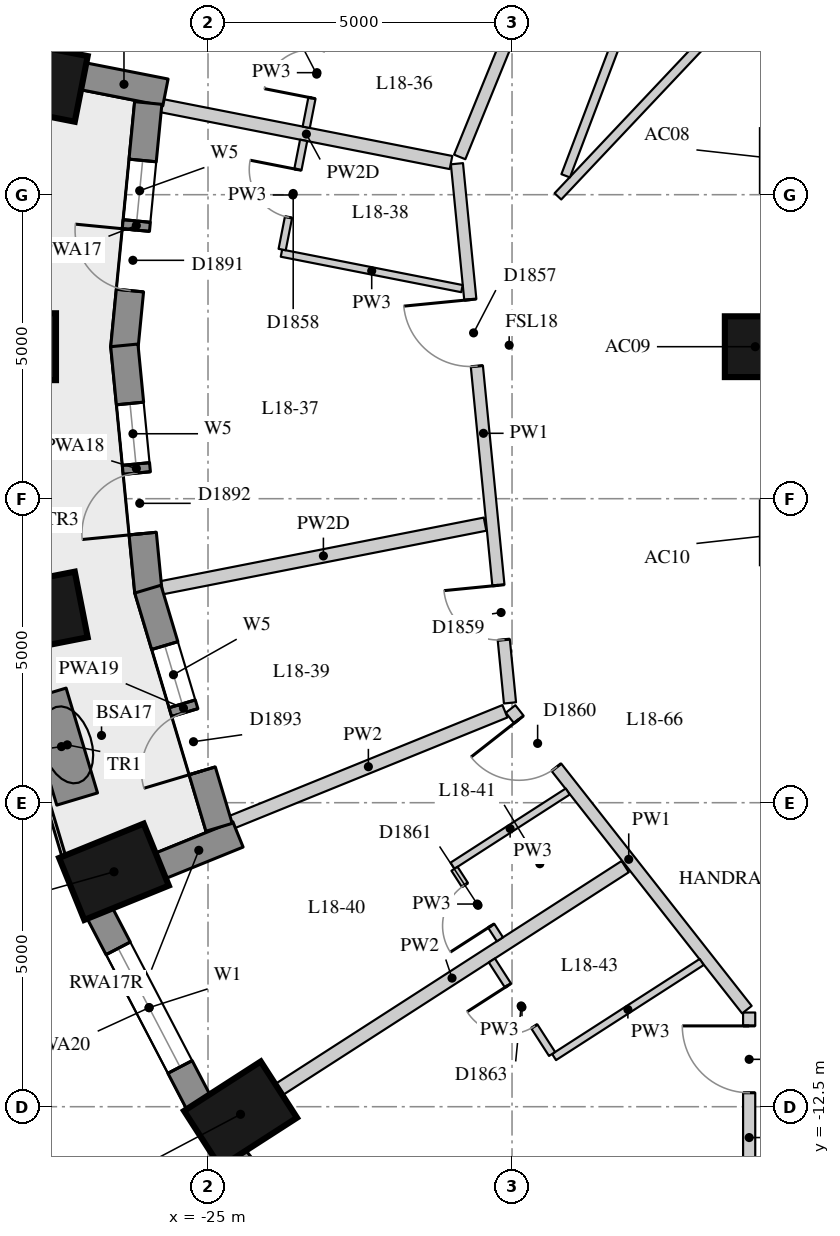
"""IFC4 building model, lengths in metres.
Left out: names, types, materials, properties, quantities, classifications, styles, units other than length and angle.
Written with IfcOpenShell. Run it as: python <this file> out.ifc"""

import sys

from ifc_helpers import new_model, si_unit, direction, frame, frame_2d, origin, origin_2d, place, context, subcontext, project, spatial, rectangle, extrude, element, fill, save


model = new_model("IFC4")
c1 = context("Model", 3, precision=1e-05, world=origin(), true_north=direction((0.0, 1.0)))
c2 = subcontext(c1, "Body", "Model", "MODEL_VIEW")
j1 = project(units=[si_unit("LENGTHUNIT", "METRE"), si_unit("PLANEANGLEUNIT", "RADIAN")], contexts=[c1])
p1 = place(None, origin())
s1 = spatial("IfcSite", under=j1, at=p1, CompositionType="ELEMENT")
p2 = place(p1, origin())
s2 = spatial("IfcBuilding", under=s1, at=p2, CompositionType="ELEMENT")
p3 = place(p2, frame((0.0, 0.0, 67.9)))
s3 = spatial("IfcBuildingStorey", under=s2, at=p3, CompositionType="ELEMENT", Elevation=67.9)
for number, where, z_axis, x_axis in (
    (1, (-27.821, 4.385, 0.0), (0.0, 0.0, 1.0), (-0.981, 0.193, 0.0)),
    (2, (-28.25, 0.0, 0.0), (0.0, 0.0, 1.0), (-1.0, 0.0, 0.0)),
    (3, (-27.821, -4.385, 0.0), (0.0, 0.0, 1.0), (-0.981, -0.193, 0.0)),
    (4, (-26.546, -8.636, 0.0), (0.0, 0.0, 1.0), (-0.927, -0.376, 0.0)),
    (5, (-24.465, -12.625, 0.0), (0.0, 0.0, 1.0), (-0.841, -0.541, 0.0)),
):
    element("IfcColumn", number, at=place(p3, frame(where, z_axis=z_axis, x_axis=x_axis)), inside=s3, PredefinedType="COLUMN", context=c2, shape_type="SweptSolid", body=[
        extrude(rectangle(XDim=1.5, YDim=1.1, at=origin_2d()), origin(), (0.0, 0.0, 1.0), 3.3),
    ])
p4 = place(p3, frame((-16.0, 0.0, 0.0), z_axis=(0.0, 0.0, 1.0), x_axis=(1.0, 0.0, 0.0)))
e6 = element("IfcColumn", 6, at=p4, inside=s3, PredefinedType="COLUMN", context=c2, shape_type="SweptSolid", body=[
    extrude(rectangle(XDim=1.0, YDim=1.0, at=origin_2d()), origin(), (0.0, 0.0, 1.0), 3.3),
])
p5 = place(p3, frame((-26.786, -9.305, 0.0), z_axis=(0.0, 0.0, 1.0), x_axis=(0.462492775226, -0.886623050041, 0.0)))
e7 = element("IfcWall", 7, at=p5, inside=s3, PredefinedType="SOLIDWALL", context=c2, shape_type="SweptSolid", body=[
    extrude(rectangle(XDim=3.532, YDim=0.45, at=frame_2d((1.766, 0.0))), origin(), (0.0, 0.0, 1.0), 3.02),
])
p6 = place(p5, frame((0.666, 0.0, 0.4)))
e8 = element("IfcOpeningElement", 8, at=p6, cuts=e7, PredefinedType="OPENING", context=c2, shape_type="SweptSolid", body=[
    extrude(rectangle(XDim=2.2, YDim=1.75, at=frame_2d((1.1, 0.875))), frame((0.0, 0.235, 0.0), z_axis=(0.0, -1.0, 0.0), x_axis=(1.0, 0.0, 0.0)), (0.0, 0.0, 1.0), 0.47),
])
p7 = place(p3, frame((-24.578, -13.328, 0.0), z_axis=(0.0, 0.0, 1.0), x_axis=(0.616661975264, -0.787228053529, 0.0)))
e9 = element("IfcWall", 9, at=p7, inside=s3, PredefinedType="SOLIDWALL", context=c2, shape_type="SweptSolid", body=[
    extrude(rectangle(XDim=3.61, YDim=0.45, at=frame_2d((1.805, 0.0))), origin(), (0.0, 0.0, 1.0), 3.02),
])
p8 = place(p7, frame((0.705, 0.0, 0.4)))
e10 = element("IfcOpeningElement", 10, at=p8, cuts=e9, PredefinedType="OPENING", context=c2, shape_type="SweptSolid", body=[
    extrude(rectangle(XDim=2.2, YDim=1.75, at=frame_2d((1.1, 0.875))), frame((0.0, 0.235, 0.0), z_axis=(0.0, -1.0, 0.0), x_axis=(1.0, 0.0, 0.0)), (0.0, 0.0, 1.0), 0.47),
])
p9 = place(p3, frame((-27.064, 4.45, 0.0), z_axis=(0.0, 0.0, 1.0), x_axis=(0.98123042829, -0.192838913596, 0.0)))
e11 = element("IfcWall", 11, at=p9, inside=s3, PredefinedType="SOLIDWALL", context=c2, shape_type="SweptSolid", body=[
    extrude(rectangle(XDim=1.39, YDim=0.45, at=frame_2d((0.695, 0.0))), origin(), (0.0, 0.0, 1.0), 2.47),
])
p10 = place(p3, frame((-25.796, -8.544, 0.0), z_axis=(0.0, 0.0, 1.0), x_axis=(0.926575599743, 0.376108572039, 0.0)))
e12 = element("IfcWall", 12, at=p10, inside=s3, PredefinedType="SOLIDWALL", context=c2, shape_type="SweptSolid", body=[
    extrude(rectangle(XDim=1.39, YDim=0.45, at=frame_2d((0.695, 0.0))), origin(), (0.0, 0.0, 1.0), 3.02),
])
p11 = place(p3, frame((-25.983, 4.008, 0.0), z_axis=(0.0, 0.0, 1.0), x_axis=(-0.097133468736, -0.995271364629, 0.0)))
e13 = element("IfcWall", 13, at=p11, inside=s3, PredefinedType="SOLIDWALL", context=c2, shape_type="SweptSolid", body=[
    extrude(rectangle(XDim=4.049, YDim=0.45, at=frame_2d((2.024, 0.0))), origin(), (0.0, 0.0, 1.0), 3.02),
])
p12 = place(p11, frame((0.949, 0.0, 0.4)))
e14 = element("IfcOpeningElement", 14, at=p12, cuts=e13, PredefinedType="OPENING", context=c2, shape_type="SweptSolid", body=[
    extrude(rectangle(XDim=1.0, YDim=1.75, at=frame_2d((0.5, 0.875))), frame((0.0, 0.235, 0.0), z_axis=(0.0, -1.0, 0.0), x_axis=(1.0, 0.0, 0.0)), (0.0, 0.0, 1.0), 0.47),
])
p13 = place(p11, frame((2.1, 0.0, 0.0)))
e15 = element("IfcOpeningElement", 15, at=p13, cuts=e13, PredefinedType="OPENING", context=c2, shape_type="SweptSolid", body=[
    extrude(rectangle(XDim=1.0, YDim=2.15, at=frame_2d((0.5, 1.075))), frame((0.0, 0.235, 0.0), z_axis=(0.0, -1.0, 0.0), x_axis=(1.0, 0.0, 0.0)), (0.0, 0.0, 1.0), 0.47),
])
p14 = place(p3, frame((-26.376, 0.022, 0.0), z_axis=(0.0, 0.0, 1.0), x_axis=(0.097092719726, -0.995275340685, 0.0)))
e16 = element("IfcWall", 16, at=p14, inside=s3, PredefinedType="SOLIDWALL", context=c2, shape_type="SweptSolid", body=[
    extrude(rectangle(XDim=4.071, YDim=0.45, at=frame_2d((2.036, 0.0))), origin(), (0.0, 0.0, 1.0), 3.02),
])
p15 = place(p14, frame((0.96, 0.0, 0.4)))
e17 = element("IfcOpeningElement", 17, at=p15, cuts=e16, PredefinedType="OPENING", context=c2, shape_type="SweptSolid", body=[
    extrude(rectangle(XDim=1.0, YDim=1.75, at=frame_2d((0.5, 0.875))), frame((0.0, 0.235, 0.0), z_axis=(0.0, -1.0, 0.0), x_axis=(1.0, 0.0, 0.0)), (0.0, 0.0, 1.0), 0.47),
])
p16 = place(p14, frame((2.111, 0.0, 0.0)))
e18 = element("IfcOpeningElement", 18, at=p16, cuts=e16, PredefinedType="OPENING", context=c2, shape_type="SweptSolid", body=[
    extrude(rectangle(XDim=1.0, YDim=2.15, at=frame_2d((0.5, 1.075))), frame((0.0, 0.235, 0.0), z_axis=(0.0, -1.0, 0.0), x_axis=(1.0, 0.0, 0.0)), (0.0, 0.0, 1.0), 0.47),
])
p17 = place(p3, frame((-25.989, -3.987, 0.0), z_axis=(0.0, 0.0, 1.0), x_axis=(0.286427456555, -0.958101932015, 0.0)))
e19 = element("IfcWall", 19, at=p17, inside=s3, PredefinedType="SOLIDWALL", context=c2, shape_type="SweptSolid", body=[
    extrude(rectangle(XDim=4.089, YDim=0.45, at=frame_2d((2.044, 0.0))), origin(), (0.0, 0.0, 1.0), 3.02),
])
p18 = place(p17, frame((0.969, 0.0, 0.4)))
e20 = element("IfcOpeningElement", 20, at=p18, cuts=e19, PredefinedType="OPENING", context=c2, shape_type="SweptSolid", body=[
    extrude(rectangle(XDim=1.0, YDim=1.75, at=frame_2d((0.5, 0.875))), frame((0.0, 0.235, 0.0), z_axis=(0.0, -1.0, 0.0), x_axis=(1.0, 0.0, 0.0)), (0.0, 0.0, 1.0), 0.47),
])
p19 = place(p17, frame((2.119, 0.0, 0.0)))
e21 = element("IfcOpeningElement", 21, at=p19, cuts=e19, PredefinedType="OPENING", context=c2, shape_type="SweptSolid", body=[
    extrude(rectangle(XDim=1.0, YDim=2.15, at=frame_2d((0.5, 1.075))), frame((0.0, 0.235, 0.0), z_axis=(0.0, -1.0, 0.0), x_axis=(1.0, 0.0, 0.0)), (0.0, 0.0, 1.0), 0.47),
])
p20 = place(p3, frame((-27.669, -5.715, 0.0), z_axis=(0.0, 0.0, 1.0), x_axis=(0.287024312863, -0.957923297465, 0.0)))
e22 = element("IfcWall", 22, at=p20, inside=s3, PredefinedType="USERDEFINED", context=c2, shape_type="SweptSolid", body=[
    extrude(rectangle(XDim=1.8, YDim=0.7, at=frame_2d((0.9, 0.0))), origin(), (0.0, 0.0, 1.0), 0.75),
])
p21 = place(p3, frame((-16.1, -15.064, 0.0), z_axis=(0.0, 0.0, 1.0), x_axis=(0.0, 1.0, 0.0)))
e23 = element("IfcWall", 23, at=p21, inside=s3, PredefinedType="PARTITIONING", context=c2, shape_type="SweptSolid", body=[
    extrude(rectangle(XDim=4.113, YDim=0.2, at=frame_2d((2.057, 0.0))), origin(), (0.0, 0.0, 1.0), 3.02),
])
p22 = place(p21, frame((2.793, 0.0, 0.0)))
e24 = element("IfcOpeningElement", 24, at=p22, cuts=e23, PredefinedType="OPENING", context=c2, shape_type="SweptSolid", body=[
    extrude(rectangle(XDim=1.1, YDim=2.1, at=frame_2d((0.55, 1.05))), frame((0.0, 0.11, 0.0), z_axis=(0.0, -1.0, 0.0), x_axis=(1.0, 0.0, 0.0)), (0.0, 0.0, 1.0), 0.22),
])
p23 = place(p3, frame((-16.137, -10.904, 0.0), z_axis=(0.0, 0.0, 1.0), x_axis=(-0.617888403737, 0.786265807808, 0.0)))
e25 = element("IfcWall", 25, at=p23, inside=s3, PredefinedType="PARTITIONING", context=c2, shape_type="SweptSolid", body=[
    extrude(rectangle(XDim=6.29, YDim=0.2, at=frame_2d((3.145, 0.0))), origin(), (0.0, 0.0, 1.0), 3.02),
])
p24 = place(p23, frame((5.07, 0.0, 0.0)))
e26 = element("IfcOpeningElement", 26, at=p24, cuts=e25, PredefinedType="OPENING", context=c2, shape_type="SweptSolid", body=[
    extrude(rectangle(XDim=1.0, YDim=2.1, at=frame_2d((0.5, 1.05))), frame((0.0, 0.11, 0.0), z_axis=(0.0, -1.0, 0.0), x_axis=(1.0, 0.0, 0.0)), (0.0, 0.0, 1.0), 0.22),
])
p25 = place(p3, frame((-20.034, -5.858, 0.0), z_axis=(0.0, 0.0, 1.0), x_axis=(-0.097894942705, 0.995196754513, 0.0)))
e27 = element("IfcWall", 27, at=p25, inside=s3, PredefinedType="PARTITIONING", context=c2, shape_type="SweptSolid", body=[
    extrude(rectangle(XDim=8.911, YDim=0.2, at=frame_2d((4.455, 0.0))), origin(), (0.0, 0.0, 1.0), 3.02),
])
p26 = place(p25, frame((5.565, 0.0, 0.0)))
e28 = element("IfcOpeningElement", 28, at=p26, cuts=e27, PredefinedType="OPENING", context=c2, shape_type="SweptSolid", body=[
    extrude(rectangle(XDim=1.1, YDim=2.1, at=frame_2d((0.55, 1.05))), frame((0.0, 0.11, 0.0), z_axis=(0.0, -1.0, 0.0), x_axis=(1.0, 0.0, 0.0)), (0.0, 0.0, 1.0), 0.22),
])
p27 = place(p25, frame((1.044, 0.0, 0.0)))
e29 = element("IfcOpeningElement", 29, at=p27, cuts=e27, PredefinedType="OPENING", context=c2, shape_type="SweptSolid", body=[
    extrude(rectangle(XDim=0.9, YDim=2.1, at=frame_2d((0.45, 1.05))), frame((0.0, 0.11, 0.0), z_axis=(0.0, -1.0, 0.0), x_axis=(1.0, 0.0, 0.0)), (0.0, 0.0, 1.0), 0.22),
])
p28 = place(p3, frame((-20.861, 3.121, 0.0), z_axis=(0.0, 0.0, 1.0), x_axis=(0.377214346955, 0.926125983034, 0.0)))
e30 = element("IfcWall", 30, at=p28, inside=s3, PredefinedType="PARTITIONING", context=c2, shape_type="SweptSolid", body=[
    extrude(rectangle(XDim=6.107, YDim=0.2, at=frame_2d((3.054, 0.0))), origin(), (0.0, 0.0, 1.0), 3.02),
])
p29 = place(p28, frame((2.285, 0.0, 0.0)))
e31 = element("IfcOpeningElement", 31, at=p29, cuts=e30, PredefinedType="OPENING", context=c2, shape_type="SweptSolid", body=[
    extrude(rectangle(XDim=1.1, YDim=2.1, at=frame_2d((0.55, 1.05))), frame((0.0, 0.11, 0.0), z_axis=(0.0, -1.0, 0.0), x_axis=(1.0, 0.0, 0.0)), (0.0, 0.0, 1.0), 0.22),
])
p30 = place(p3, frame((-14.499, 7.501, 0.0), z_axis=(0.0, 0.0, 1.0), x_axis=(-0.686403699782, -0.727220709913, 0.0)))
e32 = element("IfcWall", 32, at=p30, inside=s3, PredefinedType="PARTITIONING", context=c2, shape_type="SweptSolid", body=[
    extrude(rectangle(XDim=6.915, YDim=0.15, at=frame_2d((3.457, 0.0))), origin(), (0.0, 0.0, 1.0), 3.02),
])
p31 = place(p3, frame((-19.118, 2.811, 0.0), z_axis=(0.0, 0.0, 1.0), x_axis=(0.35451573991, 0.935050046872, 0.0)))
e33 = element("IfcWall", 33, at=p31, inside=s3, PredefinedType="PARTITIONING", context=c2, shape_type="SweptSolid", body=[
    extrude(rectangle(XDim=5.367, YDim=0.15, at=frame_2d((2.684, 0.0))), origin(), (0.0, 0.0, 1.0), 3.02),
])
p32 = place(p3, frame((-25.761, 3.964, 0.0), z_axis=(0.0, 0.0, 1.0), x_axis=(0.981216494224, -0.192909801364, 0.0)))
e34 = element("IfcWall", 34, at=p32, inside=s3, PredefinedType="PARTITIONING", context=c2, shape_type="SweptSolid", body=[
    extrude(rectangle(XDim=4.848, YDim=0.22, at=frame_2d((2.424, 0.0))), origin(), (0.0, 0.0, 1.0), 2.47),
])
p33 = place(p3, frame((-25.761, -3.964, 0.0), z_axis=(0.0, 0.0, 1.0), x_axis=(0.981209698951, 0.192944361627, 0.0)))
e35 = element("IfcWall", 35, at=p33, inside=s3, PredefinedType="PARTITIONING", context=c2, shape_type="SweptSolid", body=[
    extrude(rectangle(XDim=5.419, YDim=0.22, at=frame_2d((2.71, 0.0))), origin(), (0.0, 0.0, 1.0), 2.47),
])
p34 = place(p3, frame((-24.608, -7.82, 0.0), z_axis=(0.0, 0.0, 1.0), x_axis=(0.92655764882, 0.376152792643, 0.0)))
e36 = element("IfcWall", 36, at=p34, inside=s3, PredefinedType="PARTITIONING", context=c2, shape_type="SweptSolid", body=[
    extrude(rectangle(XDim=4.848, YDim=0.22, at=frame_2d((2.424, 0.0))), origin(), (0.0, 0.0, 1.0), 3.02),
])
p35 = place(p3, frame((-23.835, -12.219, 0.0), z_axis=(0.0, 0.0, 1.0), x_axis=(0.840749666863, 0.541424046076, 0.0)))
e37 = element("IfcWall", 37, at=p35, inside=s3, PredefinedType="PARTITIONING", context=c2, shape_type="SweptSolid", body=[
    extrude(rectangle(XDim=6.775, YDim=0.22, at=frame_2d((3.387, 0.0))), origin(), (0.0, 0.0, 1.0), 3.02),
])
p36 = place(p3, frame((-20.823, 0.955, 0.0), z_axis=(0.0, 0.0, 1.0), x_axis=(-0.981208735185, 0.192949262754, 0.0)))
e38 = element("IfcWall", 38, at=p36, inside=s3, PredefinedType="PARTITIONING", context=c2, shape_type="SweptSolid", body=[
    extrude(rectangle(XDim=3.025, YDim=0.12, at=frame_2d((1.513, 0.0))), origin(), (0.0, 0.0, 1.0), 3.02),
])
p37 = place(p3, frame((-19.084, -7.316, 0.0), z_axis=(0.0, 0.0, 1.0), x_axis=(-0.840762836723, -0.54140359473, 0.0)))
e39 = element("IfcWall", 39, at=p37, inside=s3, PredefinedType="PARTITIONING", context=c2, shape_type="SweptSolid", body=[
    extrude(rectangle(XDim=2.253, YDim=0.12, at=frame_2d((1.127, 0.0))), origin(), (0.0, 0.0, 1.0), 3.02),
])
p38 = place(p3, frame((-16.881, -10.12, 0.0), z_axis=(0.0, 0.0, 1.0), x_axis=(-0.840749755927, -0.541423907773, 0.0)))
e40 = element("IfcWall", 40, at=p38, inside=s3, PredefinedType="PARTITIONING", context=c2, shape_type="SweptSolid", body=[
    extrude(rectangle(XDim=2.888, YDim=0.12, at=frame_2d((1.444, 0.0))), origin(), (0.0, 0.0, 1.0), 3.02),
])
p39 = place(p3, frame((-23.032, 5.405, 0.0), z_axis=(0.0, 0.0, 1.0), x_axis=(-0.19288291118, -0.981221780524, 0.0)))
e41 = element("IfcWall", 41, at=p39, inside=s3, PredefinedType="PARTITIONING", context=c2, shape_type="SweptSolid", body=[
    extrude(rectangle(XDim=1.83, YDim=0.12, at=frame_2d((0.915, 0.0))), origin(), (0.0, 0.0, 1.0), 3.02),
])
p40 = place(p39, frame((0.54, 0.0, 0.0)))
e42 = element("IfcOpeningElement", 42, at=p40, cuts=e41, PredefinedType="OPENING", context=c2, shape_type="SweptSolid", body=[
    extrude(rectangle(XDim=0.8, YDim=2.1, at=frame_2d((0.4, 1.05))), frame((0.0, 0.07, 0.0), z_axis=(0.0, -1.0, 0.0), x_axis=(1.0, 0.0, 0.0)), (0.0, 0.0, 1.0), 0.14),
])
p41 = place(p3, frame((-23.781, 1.598, 0.0), z_axis=(0.0, 0.0, 1.0), x_axis=(0.193036598643, 0.981191557029, 0.0)))
e43 = element("IfcWall", 43, at=p41, inside=s3, PredefinedType="PARTITIONING", context=c2, shape_type="SweptSolid", body=[
    extrude(rectangle(XDim=1.83, YDim=0.12, at=frame_2d((0.915, 0.0))), origin(), (0.0, 0.0, 1.0), 3.02),
])
p42 = place(p41, frame((0.54, 0.0, 0.0)))
e44 = element("IfcOpeningElement", 44, at=p42, cuts=e43, PredefinedType="OPENING", context=c2, shape_type="SweptSolid", body=[
    extrude(rectangle(XDim=0.8, YDim=2.1, at=frame_2d((0.4, 1.05))), frame((0.0, 0.07, 0.0), z_axis=(0.0, -1.0, 0.0), x_axis=(1.0, 0.0, 0.0)), (0.0, 0.0, 1.0), 0.14),
])
p43 = place(p3, frame((-20.946, -8.587, 0.0), z_axis=(0.0, 0.0, 1.0), x_axis=(0.541526323973, -0.840683793375, 0.0)))
e45 = element("IfcWall", 45, at=p43, inside=s3, PredefinedType="PARTITIONING", context=c2, shape_type="SweptSolid", body=[
    extrude(rectangle(XDim=1.38, YDim=0.12, at=frame_2d((0.69, 0.0))), origin(), (0.0, 0.0, 1.0), 3.02),
])
p44 = place(p43, frame((0.315, 0.0, 0.0)))
e46 = element("IfcOpeningElement", 46, at=p44, cuts=e45, PredefinedType="OPENING", context=c2, shape_type="SweptSolid", body=[
    extrude(rectangle(XDim=0.8, YDim=2.1, at=frame_2d((0.4, 1.05))), frame((0.0, 0.07, 0.0), z_axis=(0.0, -1.0, 0.0), x_axis=(1.0, 0.0, 0.0)), (0.0, 0.0, 1.0), 0.14),
])
p45 = place(p3, frame((-19.341, -11.633, 0.0), z_axis=(0.0, 0.0, 1.0), x_axis=(-0.541391271501, 0.840770772055, 0.0)))
e47 = element("IfcWall", 47, at=p45, inside=s3, PredefinedType="PARTITIONING", context=c2, shape_type="SweptSolid", body=[
    extrude(rectangle(XDim=1.83, YDim=0.12, at=frame_2d((0.915, 0.0))), origin(), (0.0, 0.0, 1.0), 3.02),
])
p46 = place(p45, frame((0.54, 0.0, 0.0)))
e48 = element("IfcOpeningElement", 48, at=p46, cuts=e47, PredefinedType="OPENING", context=c2, shape_type="SweptSolid", body=[
    extrude(rectangle(XDim=0.8, YDim=2.1, at=frame_2d((0.4, 1.05))), frame((0.0, 0.07, 0.0), z_axis=(0.0, -1.0, 0.0), x_axis=(1.0, 0.0, 0.0)), (0.0, 0.0, 1.0), 0.14),
])
p47 = place(p6, origin())
e49 = element("IfcWindow", 49, at=p47, inside=s3, PartitioningType="SINGLE_PANEL", PredefinedType="WINDOW", context=c2, shape_type="SweptSolid", body=[
    extrude(rectangle(XDim=2.2, YDim=1.75, at=frame_2d((1.1, 0.875))), frame((0.0, 0.035, 0.0), z_axis=(0.0, -1.0, 0.0), x_axis=(1.0, 0.0, 0.0)), (0.0, 0.0, 1.0), 0.06),
])
fill(e8, e49)
p48 = place(p12, origin())
e50 = element("IfcWindow", 50, at=p48, inside=s3, PartitioningType="SINGLE_PANEL", PredefinedType="WINDOW", context=c2, shape_type="SweptSolid", body=[
    extrude(rectangle(XDim=1.0, YDim=1.75, at=frame_2d((0.5, 0.875))), frame((0.0, 0.035, 0.0), z_axis=(0.0, -1.0, 0.0), x_axis=(1.0, 0.0, 0.0)), (0.0, 0.0, 1.0), 0.06),
])
fill(e14, e50)
p49 = place(p13, frame((1.0, 0.0, 0.0), z_axis=(0.0, 0.0, 1.0), x_axis=(-1.0, 0.0, 0.0)))
e51 = element("IfcDoor", 51, at=p49, inside=s3, OperationType="SINGLE_SWING_RIGHT", PredefinedType="DOOR", context=c2, shape_type="SweptSolid", body=[
    extrude(rectangle(XDim=1.0, YDim=2.15, at=frame_2d((0.5, 1.075))), frame((0.0, 0.075, 0.0), z_axis=(0.0, -1.0, 0.0), x_axis=(1.0, 0.0, 0.0)), (0.0, 0.0, 1.0), 0.05),
])
fill(e15, e51)
p50 = place(p15, origin())
e52 = element("IfcWindow", 52, at=p50, inside=s3, PartitioningType="SINGLE_PANEL", PredefinedType="WINDOW", context=c2, shape_type="SweptSolid", body=[
    extrude(rectangle(XDim=1.0, YDim=1.75, at=frame_2d((0.5, 0.875))), frame((0.0, 0.035, 0.0), z_axis=(0.0, -1.0, 0.0), x_axis=(1.0, 0.0, 0.0)), (0.0, 0.0, 1.0), 0.06),
])
fill(e17, e52)
p51 = place(p16, frame((1.0, 0.0, 0.0), z_axis=(0.0, 0.0, 1.0), x_axis=(-1.0, 0.0, 0.0)))
e53 = element("IfcDoor", 53, at=p51, inside=s3, OperationType="SINGLE_SWING_LEFT", PredefinedType="DOOR", context=c2, shape_type="SweptSolid", body=[
    extrude(rectangle(XDim=1.0, YDim=2.15, at=frame_2d((0.5, 1.075))), frame((0.0, 0.075, 0.0), z_axis=(0.0, -1.0, 0.0), x_axis=(1.0, 0.0, 0.0)), (0.0, 0.0, 1.0), 0.05),
])
fill(e18, e53)
p52 = place(p18, origin())
e54 = element("IfcWindow", 54, at=p52, inside=s3, PartitioningType="SINGLE_PANEL", PredefinedType="WINDOW", context=c2, shape_type="SweptSolid", body=[
    extrude(rectangle(XDim=1.0, YDim=1.75, at=frame_2d((0.5, 0.875))), frame((0.0, 0.035, 0.0), z_axis=(0.0, -1.0, 0.0), x_axis=(1.0, 0.0, 0.0)), (0.0, 0.0, 1.0), 0.06),
])
fill(e20, e54)
p53 = place(p19, frame((1.0, 0.0, 0.0), z_axis=(0.0, 0.0, 1.0), x_axis=(-1.0, 0.0, 0.0)))
e55 = element("IfcDoor", 55, at=p53, inside=s3, OperationType="SINGLE_SWING_LEFT", PredefinedType="DOOR", context=c2, shape_type="SweptSolid", body=[
    extrude(rectangle(XDim=1.0, YDim=2.15, at=frame_2d((0.5, 1.075))), frame((0.0, 0.075, 0.0), z_axis=(0.0, -1.0, 0.0), x_axis=(1.0, 0.0, 0.0)), (0.0, 0.0, 1.0), 0.05),
])
fill(e21, e55)
p54 = place(p40, origin())
e56 = element("IfcDoor", 56, at=p54, inside=s3, OperationType="SINGLE_SWING_LEFT", PredefinedType="DOOR", context=c2, shape_type="SweptSolid", body=[
    extrude(rectangle(XDim=0.8, YDim=2.1, at=frame_2d((0.4, 1.05))), frame((0.0, 0.025, 0.0), z_axis=(0.0, -1.0, 0.0), x_axis=(1.0, 0.0, 0.0)), (0.0, 0.0, 1.0), 0.05),
])
fill(e42, e56)
p55 = place(p26, origin())
e57 = element("IfcDoor", 57, at=p55, inside=s3, OperationType="SINGLE_SWING_RIGHT", PredefinedType="DOOR", context=c2, shape_type="SweptSolid", body=[
    extrude(rectangle(XDim=1.1, YDim=2.1, at=frame_2d((0.55, 1.05))), frame((0.0, 0.025, 0.0), z_axis=(0.0, -1.0, 0.0), x_axis=(1.0, 0.0, 0.0)), (0.0, 0.0, 1.0), 0.05),
])
fill(e28, e57)
p56 = place(p42, origin())
e58 = element("IfcDoor", 58, at=p56, inside=s3, OperationType="SINGLE_SWING_RIGHT", PredefinedType="DOOR", context=c2, shape_type="SweptSolid", body=[
    extrude(rectangle(XDim=0.8, YDim=2.1, at=frame_2d((0.4, 1.05))), frame((0.0, 0.025, 0.0), z_axis=(0.0, -1.0, 0.0), x_axis=(1.0, 0.0, 0.0)), (0.0, 0.0, 1.0), 0.05),
])
fill(e44, e58)
p57 = place(p27, origin())
e59 = element("IfcDoor", 59, at=p57, inside=s3, OperationType="SINGLE_SWING_RIGHT", PredefinedType="DOOR", context=c2, shape_type="SweptSolid", body=[
    extrude(rectangle(XDim=0.9, YDim=2.1, at=frame_2d((0.45, 1.05))), frame((0.0, 0.025, 0.0), z_axis=(0.0, -1.0, 0.0), x_axis=(1.0, 0.0, 0.0)), (0.0, 0.0, 1.0), 0.05),
])
fill(e29, e59)
p58 = place(p24, origin())
e60 = element("IfcDoor", 60, at=p58, inside=s3, OperationType="SINGLE_SWING_RIGHT", PredefinedType="DOOR", context=c2, shape_type="SweptSolid", body=[
    extrude(rectangle(XDim=1.0, YDim=2.1, at=frame_2d((0.5, 1.05))), frame((0.0, 0.025, 0.0), z_axis=(0.0, -1.0, 0.0), x_axis=(1.0, 0.0, 0.0)), (0.0, 0.0, 1.0), 0.05),
])
fill(e26, e60)
p59 = place(p44, origin())
e61 = element("IfcDoor", 61, at=p59, inside=s3, OperationType="SINGLE_SWING_LEFT", PredefinedType="DOOR", context=c2, shape_type="SweptSolid", body=[
    extrude(rectangle(XDim=0.8, YDim=2.1, at=frame_2d((0.4, 1.05))), frame((0.0, 0.025, 0.0), z_axis=(0.0, -1.0, 0.0), x_axis=(1.0, 0.0, 0.0)), (0.0, 0.0, 1.0), 0.05),
])
fill(e46, e61)
p60 = place(p22, origin())
e62 = element("IfcDoor", 62, at=p60, inside=s3, OperationType="SINGLE_SWING_RIGHT", PredefinedType="DOOR", context=c2, shape_type="SweptSolid", body=[
    extrude(rectangle(XDim=1.1, YDim=2.1, at=frame_2d((0.55, 1.05))), frame((0.0, 0.025, 0.0), z_axis=(0.0, -1.0, 0.0), x_axis=(1.0, 0.0, 0.0)), (0.0, 0.0, 1.0), 0.05),
])
fill(e24, e62)
p61 = place(p46, origin())
e63 = element("IfcDoor", 63, at=p61, inside=s3, OperationType="SINGLE_SWING_RIGHT", PredefinedType="DOOR", context=c2, shape_type="SweptSolid", body=[
    extrude(rectangle(XDim=0.8, YDim=2.1, at=frame_2d((0.4, 1.05))), frame((0.0, 0.025, 0.0), z_axis=(0.0, -1.0, 0.0), x_axis=(1.0, 0.0, 0.0)), (0.0, 0.0, 1.0), 0.05),
])
fill(e48, e63)
save(model, sys.argv[1])
